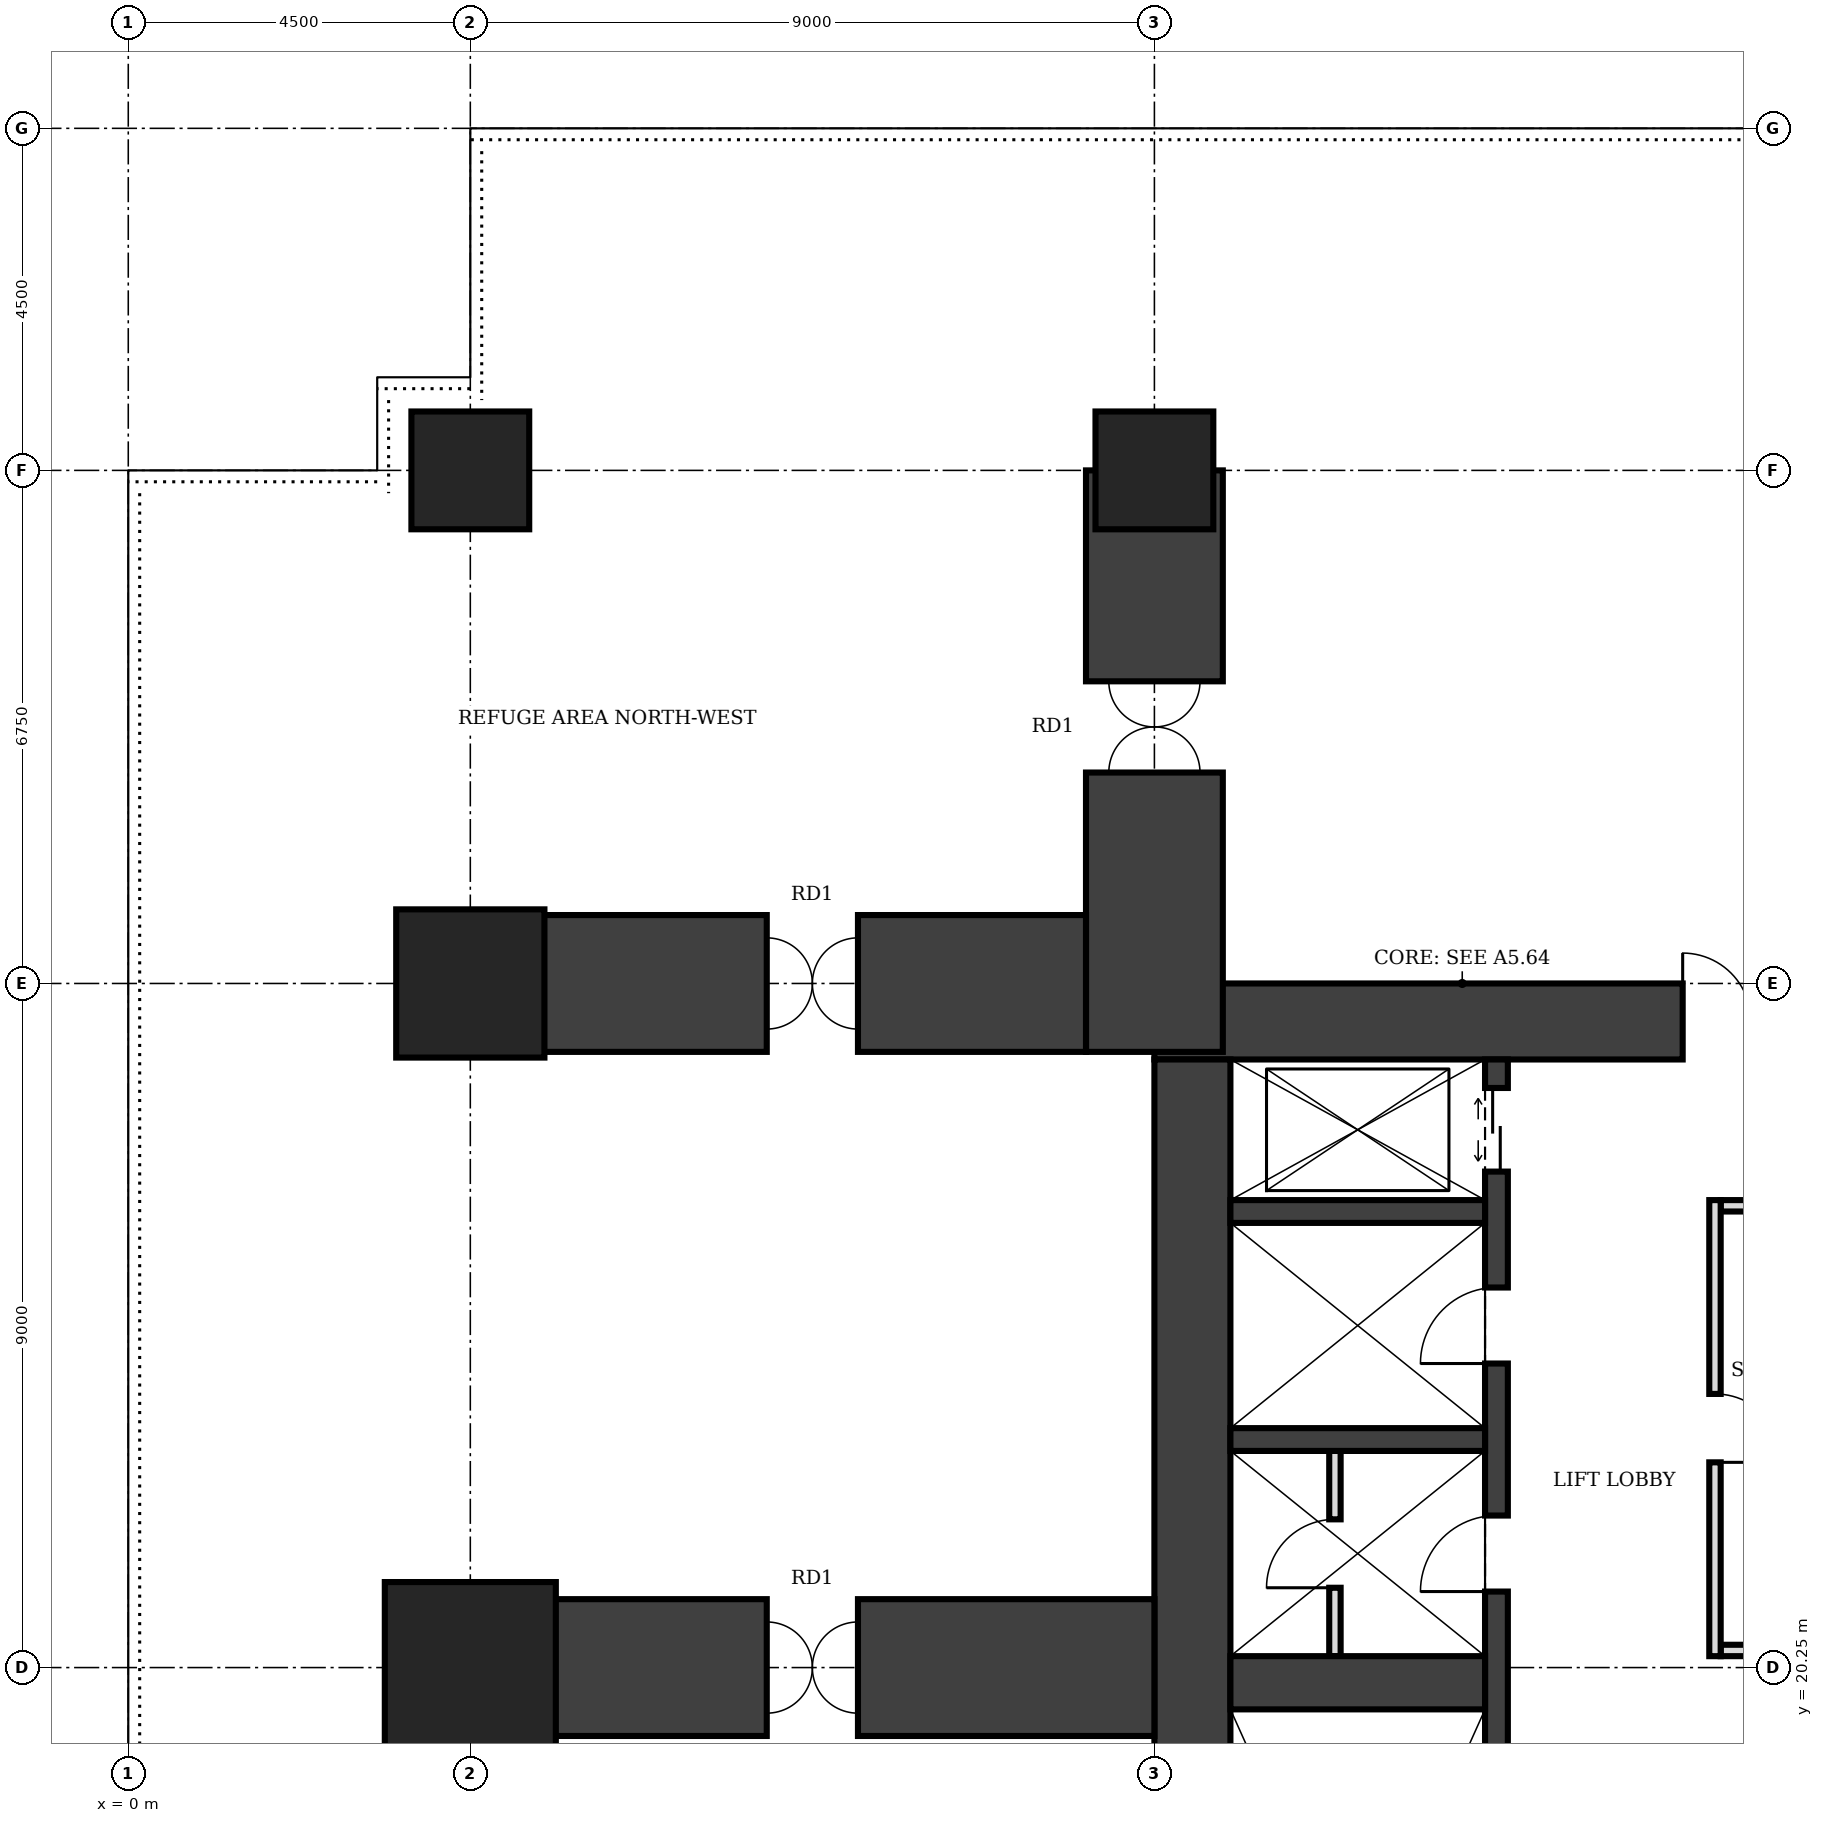
"""IFC4 building model, lengths in metres.
Left out: names, types, materials, properties, quantities, classifications, styles, units other than length and angle.
Written with IfcOpenShell. Run it as: python <this file> out.ifc"""

import sys

from ifc_helpers import new_model, si_unit, direction, frame, frame_2d, origin, origin_2d, place, context, subcontext, project, spatial, rectangle, extrude, element, fill, save


model = new_model("IFC4")
c1 = context("Model", 3, precision=1e-05, world=origin(), true_north=direction((0.0, 1.0)))
c2 = subcontext(c1, "Body", "Model", "MODEL_VIEW")
j1 = project(units=[si_unit("LENGTHUNIT", "METRE"), si_unit("PLANEANGLEUNIT", "RADIAN")], contexts=[c1])
p1 = place(None, origin())
s1 = spatial("IfcSite", under=j1, at=p1, CompositionType="ELEMENT")
p2 = place(p1, origin())
s2 = spatial("IfcBuilding", under=s1, at=p2, CompositionType="ELEMENT")
p3 = place(p2, frame((0.0, 0.0, 245.0)))
s3 = spatial("IfcBuildingStorey", under=s2, at=p3, CompositionType="ELEMENT", Elevation=245.0)
p4 = place(p3, frame((27.0, 28.75, 0.0), z_axis=(0.0, 0.0, 1.0), x_axis=(-1.0, 0.0, 0.0)))
e1 = element("IfcWall", 1, at=p4, inside=s3, PredefinedType="SHEAR", context=c2, shape_type="SweptSolid", body=[
    extrude(rectangle(XDim=13.5, YDim=1.0, at=frame_2d((6.75, 0.0))), origin(), (0.0, 0.0, 1.0), 8.0),
])
p5 = place(p4, frame((4.75, 0.0, 0.0)))
e2 = element("IfcOpeningElement", 2, at=p5, cuts=e1, PredefinedType="OPENING", context=c2, shape_type="SweptSolid", body=[
    extrude(rectangle(XDim=1.8, YDim=2.1, at=frame_2d((0.9, 1.05))), frame((0.0, 0.51, 0.0), z_axis=(0.0, -1.0, 0.0), x_axis=(1.0, 0.0, 0.0)), (0.0, 0.0, 1.0), 1.02),
])
p6 = place(p3, frame((14.0, 28.25, 0.0), z_axis=(0.0, 0.0, 1.0), x_axis=(0.0, -1.0, 0.0)))
e3 = element("IfcWall", 3, at=p6, inside=s3, PredefinedType="SHEAR", context=c2, shape_type="SweptSolid", body=[
    extrude(rectangle(XDim=16.0, YDim=1.0, at=frame_2d((8.0, 0.0))), origin(), (0.0, 0.0, 1.0), 8.0),
])
p7 = place(p3, frame((18.0, 12.25, 0.0), z_axis=(0.0, 0.0, 1.0), x_axis=(0.0, 1.0, 0.0)))
e4 = element("IfcWall", 4, at=p7, inside=s3, PredefinedType="SHEAR", context=c2, shape_type="SweptSolid", body=[
    extrude(rectangle(XDim=16.0, YDim=0.3, at=frame_2d((8.0, 0.0))), origin(), (0.0, 0.0, 1.0), 8.0),
])
p8 = place(p7, frame((0.4, 0.0, 0.0)))
e5 = element("IfcOpeningElement", 5, at=p8, cuts=e4, PredefinedType="OPENING", context=c2, shape_type="SweptSolid", body=[
    extrude(rectangle(XDim=1.0, YDim=2.1, at=frame_2d((0.5, 1.05))), frame((0.0, 0.16, 0.0), z_axis=(0.0, -1.0, 0.0), x_axis=(1.0, 0.0, 0.0)), (0.0, 0.0, 1.0), 0.32),
])
p9 = place(p7, frame((14.525, 0.0, 0.0)))
e6 = element("IfcOpeningElement", 6, at=p9, cuts=e4, PredefinedType="OPENING", context=c2, shape_type="SweptSolid", body=[
    extrude(rectangle(XDim=1.1, YDim=2.1, at=frame_2d((0.55, 1.05))), frame((0.0, 0.16, 0.0), z_axis=(0.0, -1.0, 0.0), x_axis=(1.0, 0.0, 0.0)), (0.0, 0.0, 1.0), 0.32),
])
p10 = place(p7, frame((9.0, 0.0, 0.0)))
e7 = element("IfcOpeningElement", 7, at=p10, cuts=e4, PredefinedType="OPENING", context=c2, shape_type="SweptSolid", body=[
    extrude(rectangle(XDim=1.0, YDim=2.1, at=frame_2d((0.5, 1.05))), frame((0.0, 0.16, 0.0), z_axis=(0.0, -1.0, 0.0), x_axis=(1.0, 0.0, 0.0)), (0.0, 0.0, 1.0), 0.32),
])
p11 = place(p7, frame((12.0, 0.0, 0.0)))
e8 = element("IfcOpeningElement", 8, at=p11, cuts=e4, PredefinedType="OPENING", context=c2, shape_type="SweptSolid", body=[
    extrude(rectangle(XDim=1.0, YDim=2.1, at=frame_2d((0.5, 1.05))), frame((0.0, 0.16, 0.0), z_axis=(0.0, -1.0, 0.0), x_axis=(1.0, 0.0, 0.0)), (0.0, 0.0, 1.0), 0.32),
])
p12 = place(p3, frame((14.5, 20.05, 0.0), z_axis=(0.0, 0.0, 1.0), x_axis=(1.0, 0.0, 0.0)))
e9 = element("IfcWall", 9, at=p12, inside=s3, PredefinedType="SHEAR", context=c2, shape_type="SweptSolid", body=[
    extrude(rectangle(XDim=3.35, YDim=0.7, at=frame_2d((1.675, 0.0))), origin(), (0.0, 0.0, 1.0), 8.0),
])
for number, where, z_axis, x_axis in (
    (10, (14.5, 23.25, 0.0), (0.0, 0.0, 1.0), (1.0, 0.0, 0.0)),
    (11, (14.5, 26.25, 0.0), (0.0, 0.0, 1.0), (1.0, 0.0, 0.0)),
):
    element("IfcWall", number, at=place(p3, frame(where, z_axis=z_axis, x_axis=x_axis)), inside=s3, PredefinedType="SHEAR", context=c2, shape_type="SweptSolid", body=[
        extrude(rectangle(XDim=3.35, YDim=0.3, at=frame_2d((1.675, 0.0))), origin(), (0.0, 0.0, 1.0), 8.0),
    ])
p13 = place(p3, frame((4.5, 20.25, 0.0), z_axis=(0.0, 0.0, 1.0), x_axis=(1.0, 0.0, 0.0)))
e12 = element("IfcColumn", 12, at=p13, inside=s3, PredefinedType="COLUMN", context=c2, shape_type="SweptSolid", body=[
    extrude(rectangle(XDim=2.25, YDim=2.25, at=origin_2d()), origin(), (0.0, 0.0, 1.0), 8.0),
])
p14 = place(p3, frame((4.5, 29.25, 0.0), z_axis=(0.0, 0.0, 1.0), x_axis=(1.0, 0.0, 0.0)))
e13 = element("IfcColumn", 13, at=p14, inside=s3, PredefinedType="COLUMN", context=c2, shape_type="SweptSolid", body=[
    extrude(rectangle(XDim=1.95, YDim=1.95, at=origin_2d()), origin(), (0.0, 0.0, 1.0), 8.0),
])
for number, where, z_axis, x_axis in (
    (14, (4.5, 36.0, 0.0), (0.0, 0.0, 1.0), (1.0, 0.0, 0.0)),
    (15, (13.5, 36.0, 0.0), (0.0, 0.0, 1.0), (1.0, 0.0, 0.0)),
):
    element("IfcColumn", number, at=place(p3, frame(where, z_axis=z_axis, x_axis=x_axis)), inside=s3, PredefinedType="COLUMN", context=c2, shape_type="SweptSolid", body=[
        extrude(rectangle(XDim=1.55, YDim=1.55, at=origin_2d()), origin(), (0.0, 0.0, 1.0), 8.0),
    ])
p15 = place(p3, frame((13.5, 28.35, 0.0), z_axis=(0.0, 0.0, 1.0), x_axis=(0.0, 1.0, 0.0)))
e16 = element("IfcWall", 16, at=p15, inside=s3, PredefinedType="SHEAR", context=c2, shape_type="SweptSolid", body=[
    extrude(rectangle(XDim=7.65, YDim=1.8, at=frame_2d((3.825, 0.0))), origin(), (0.0, 0.0, 1.0), 8.0),
])
p16 = place(p15, frame((3.675, 0.0, 0.0)))
e17 = element("IfcOpeningElement", 17, at=p16, cuts=e16, PredefinedType="OPENING", context=c2, shape_type="SweptSolid", body=[
    extrude(rectangle(XDim=1.2, YDim=2.1, at=frame_2d((0.6, 1.05))), frame((0.0, 0.91, 0.0), z_axis=(0.0, -1.0, 0.0), x_axis=(1.0, 0.0, 0.0)), (0.0, 0.0, 1.0), 1.82),
])
p17 = place(p3, frame((4.5, 20.25, 0.0), z_axis=(0.0, 0.0, 1.0), x_axis=(1.0, 0.0, 0.0)))
e18 = element("IfcWall", 18, at=p17, inside=s3, PredefinedType="SHEAR", context=c2, shape_type="SweptSolid", body=[
    extrude(rectangle(XDim=9.0, YDim=1.8, at=frame_2d((4.5, 0.0))), origin(), (0.0, 0.0, 1.0), 8.0),
])
p18 = place(p17, frame((3.9, 0.0, 0.0)))
e19 = element("IfcOpeningElement", 19, at=p18, cuts=e18, PredefinedType="OPENING", context=c2, shape_type="SweptSolid", body=[
    extrude(rectangle(XDim=1.2, YDim=2.1, at=frame_2d((0.6, 1.05))), frame((0.0, 0.91, 0.0), z_axis=(0.0, -1.0, 0.0), x_axis=(1.0, 0.0, 0.0)), (0.0, 0.0, 1.0), 1.82),
])
p19 = place(p3, frame((4.5, 29.25, 0.0), z_axis=(0.0, 0.0, 1.0), x_axis=(1.0, 0.0, 0.0)))
e20 = element("IfcWall", 20, at=p19, inside=s3, PredefinedType="SHEAR", context=c2, shape_type="SweptSolid", body=[
    extrude(rectangle(XDim=8.1, YDim=1.8, at=frame_2d((4.05, 0.0))), origin(), (0.0, 0.0, 1.0), 8.0),
])
p20 = place(p19, frame((3.9, 0.0, 0.0)))
e21 = element("IfcOpeningElement", 21, at=p20, cuts=e20, PredefinedType="OPENING", context=c2, shape_type="SweptSolid", body=[
    extrude(rectangle(XDim=1.2, YDim=2.1, at=frame_2d((0.6, 1.05))), frame((0.0, 0.91, 0.0), z_axis=(0.0, -1.0, 0.0), x_axis=(1.0, 0.0, 0.0)), (0.0, 0.0, 1.0), 1.82),
])
p21 = place(p3, frame((20.875, 20.4, 0.0), z_axis=(0.0, 0.0, 1.0), x_axis=(0.0, 1.0, 0.0)))
e22 = element("IfcWall", 22, at=p21, inside=s3, PredefinedType="PARTITIONING", context=c2, shape_type="SweptSolid", body=[
    extrude(rectangle(XDim=6.0, YDim=0.15, at=frame_2d((3.0, 0.0))), origin(), (0.0, 0.0, 1.0), 7.75),
])
p22 = place(p21, frame((2.55, 0.0, 0.0)))
e23 = element("IfcOpeningElement", 23, at=p22, cuts=e22, PredefinedType="OPENING", context=c2, shape_type="SweptSolid", body=[
    extrude(rectangle(XDim=0.9, YDim=2.1, at=frame_2d((0.45, 1.05))), frame((0.0, 0.085, 0.0), z_axis=(0.0, -1.0, 0.0), x_axis=(1.0, 0.0, 0.0)), (0.0, 0.0, 1.0), 0.17),
])
for number, where, z_axis, x_axis in (
    (24, (20.95, 20.475, 0.0), (0.0, 0.0, 1.0), (1.0, 0.0, 0.0)),
    (25, (20.95, 26.325, 0.0), (0.0, 0.0, 1.0), (1.0, 0.0, 0.0)),
):
    element("IfcWall", number, at=place(p3, frame(where, z_axis=z_axis, x_axis=x_axis)), inside=s3, PredefinedType="PARTITIONING", context=c2, shape_type="SweptSolid", body=[
        extrude(rectangle(XDim=1.4, YDim=0.15, at=frame_2d((0.7, 0.0))), origin(), (0.0, 0.0, 1.0), 7.75),
    ])
p23 = place(p3, frame((15.875, 20.4, 0.0), z_axis=(0.0, 0.0, 1.0), x_axis=(0.0, 1.0, 0.0)))
e26 = element("IfcWall", 26, at=p23, inside=s3, PredefinedType="PARTITIONING", context=c2, shape_type="SweptSolid", body=[
    extrude(rectangle(XDim=2.7, YDim=0.15, at=frame_2d((1.35, 0.0))), origin(), (0.0, 0.0, 1.0), 7.75),
])
p24 = place(p23, frame((0.9, 0.0, 0.0)))
e27 = element("IfcOpeningElement", 27, at=p24, cuts=e26, PredefinedType="OPENING", context=c2, shape_type="SweptSolid", body=[
    extrude(rectangle(XDim=0.9, YDim=2.1, at=frame_2d((0.45, 1.05))), frame((0.0, 0.085, 0.0), z_axis=(0.0, -1.0, 0.0), x_axis=(1.0, 0.0, 0.0)), (0.0, 0.0, 1.0), 0.17),
])
p25 = place(p5, frame((1.8, 0.0, 0.0), z_axis=(0.0, 0.0, 1.0), x_axis=(-1.0, 0.0, 0.0)))
e28 = element("IfcDoor", 28, at=p25, inside=s3, OperationType="DOUBLE_DOOR_SINGLE_SWING", PredefinedType="DOOR", context=c2, shape_type="SweptSolid", body=[
    extrude(rectangle(XDim=1.8, YDim=2.1, at=frame_2d((0.9, 1.05))), frame((0.0, 0.025, 0.0), z_axis=(0.0, -1.0, 0.0), x_axis=(1.0, 0.0, 0.0)), (0.0, 0.0, 1.0), 0.05),
])
fill(e2, e28)
p26 = place(p9, origin())
e29 = element("IfcDoor", 29, at=p26, inside=s3, OperationType="DOUBLE_DOOR_SLIDING", PredefinedType="DOOR", context=c2, shape_type="SweptSolid", body=[
    extrude(rectangle(XDim=1.1, YDim=2.1, at=frame_2d((0.55, 1.05))), frame((0.0, 0.025, 0.0), z_axis=(0.0, -1.0, 0.0), x_axis=(1.0, 0.0, 0.0)), (0.0, 0.0, 1.0), 0.05),
])
fill(e6, e29)
p27 = place(p22, frame((0.9, 0.0, 0.0), z_axis=(0.0, 0.0, 1.0), x_axis=(-1.0, 0.0, 0.0)))
e30 = element("IfcDoor", 30, at=p27, inside=s3, OperationType="SINGLE_SWING_RIGHT", PredefinedType="DOOR", context=c2, shape_type="SweptSolid", body=[
    extrude(rectangle(XDim=0.9, YDim=2.1, at=frame_2d((0.45, 1.05))), frame((0.0, 0.025, 0.0), z_axis=(0.0, -1.0, 0.0), x_axis=(1.0, 0.0, 0.0)), (0.0, 0.0, 1.0), 0.05),
])
fill(e23, e30)
p28 = place(p10, origin())
e31 = element("IfcDoor", 31, at=p28, inside=s3, OperationType="SINGLE_SWING_LEFT", PredefinedType="DOOR", context=c2, shape_type="SweptSolid", body=[
    extrude(rectangle(XDim=1.0, YDim=2.1, at=frame_2d((0.5, 1.05))), frame((0.0, 0.025, 0.0), z_axis=(0.0, -1.0, 0.0), x_axis=(1.0, 0.0, 0.0)), (0.0, 0.0, 1.0), 0.05),
])
fill(e7, e31)
p29 = place(p24, origin())
e32 = element("IfcDoor", 32, at=p29, inside=s3, OperationType="SINGLE_SWING_LEFT", PredefinedType="DOOR", context=c2, shape_type="SweptSolid", body=[
    extrude(rectangle(XDim=0.9, YDim=2.1, at=frame_2d((0.45, 1.05))), frame((0.0, 0.025, 0.0), z_axis=(0.0, -1.0, 0.0), x_axis=(1.0, 0.0, 0.0)), (0.0, 0.0, 1.0), 0.05),
])
fill(e27, e32)
p30 = place(p11, origin())
e33 = element("IfcDoor", 33, at=p30, inside=s3, OperationType="SINGLE_SWING_LEFT", PredefinedType="DOOR", context=c2, shape_type="SweptSolid", body=[
    extrude(rectangle(XDim=1.0, YDim=2.1, at=frame_2d((0.5, 1.05))), frame((0.0, 0.025, 0.0), z_axis=(0.0, -1.0, 0.0), x_axis=(1.0, 0.0, 0.0)), (0.0, 0.0, 1.0), 0.05),
])
fill(e8, e33)
p31 = place(p16, origin())
e34 = element("IfcDoor", 34, at=p31, inside=s3, OperationType="DOUBLE_DOOR_DOUBLE_SWING", PredefinedType="DOOR", context=c2, shape_type="SweptSolid", body=[
    extrude(rectangle(XDim=1.2, YDim=2.1, at=frame_2d((0.6, 1.05))), frame((0.0, 0.025, 0.0), z_axis=(0.0, -1.0, 0.0), x_axis=(1.0, 0.0, 0.0)), (0.0, 0.0, 1.0), 0.05),
])
fill(e17, e34)
p32 = place(p18, origin())
e35 = element("IfcDoor", 35, at=p32, inside=s3, OperationType="DOUBLE_DOOR_DOUBLE_SWING", PredefinedType="DOOR", context=c2, shape_type="SweptSolid", body=[
    extrude(rectangle(XDim=1.2, YDim=2.1, at=frame_2d((0.6, 1.05))), frame((0.0, 0.025, 0.0), z_axis=(0.0, -1.0, 0.0), x_axis=(1.0, 0.0, 0.0)), (0.0, 0.0, 1.0), 0.05),
])
fill(e19, e35)
p33 = place(p20, origin())
e36 = element("IfcDoor", 36, at=p33, inside=s3, OperationType="DOUBLE_DOOR_DOUBLE_SWING", PredefinedType="DOOR", context=c2, shape_type="SweptSolid", body=[
    extrude(rectangle(XDim=1.2, YDim=2.1, at=frame_2d((0.6, 1.05))), frame((0.0, 0.025, 0.0), z_axis=(0.0, -1.0, 0.0), x_axis=(1.0, 0.0, 0.0)), (0.0, 0.0, 1.0), 0.05),
])
fill(e21, e36)
save(model, sys.argv[1])
